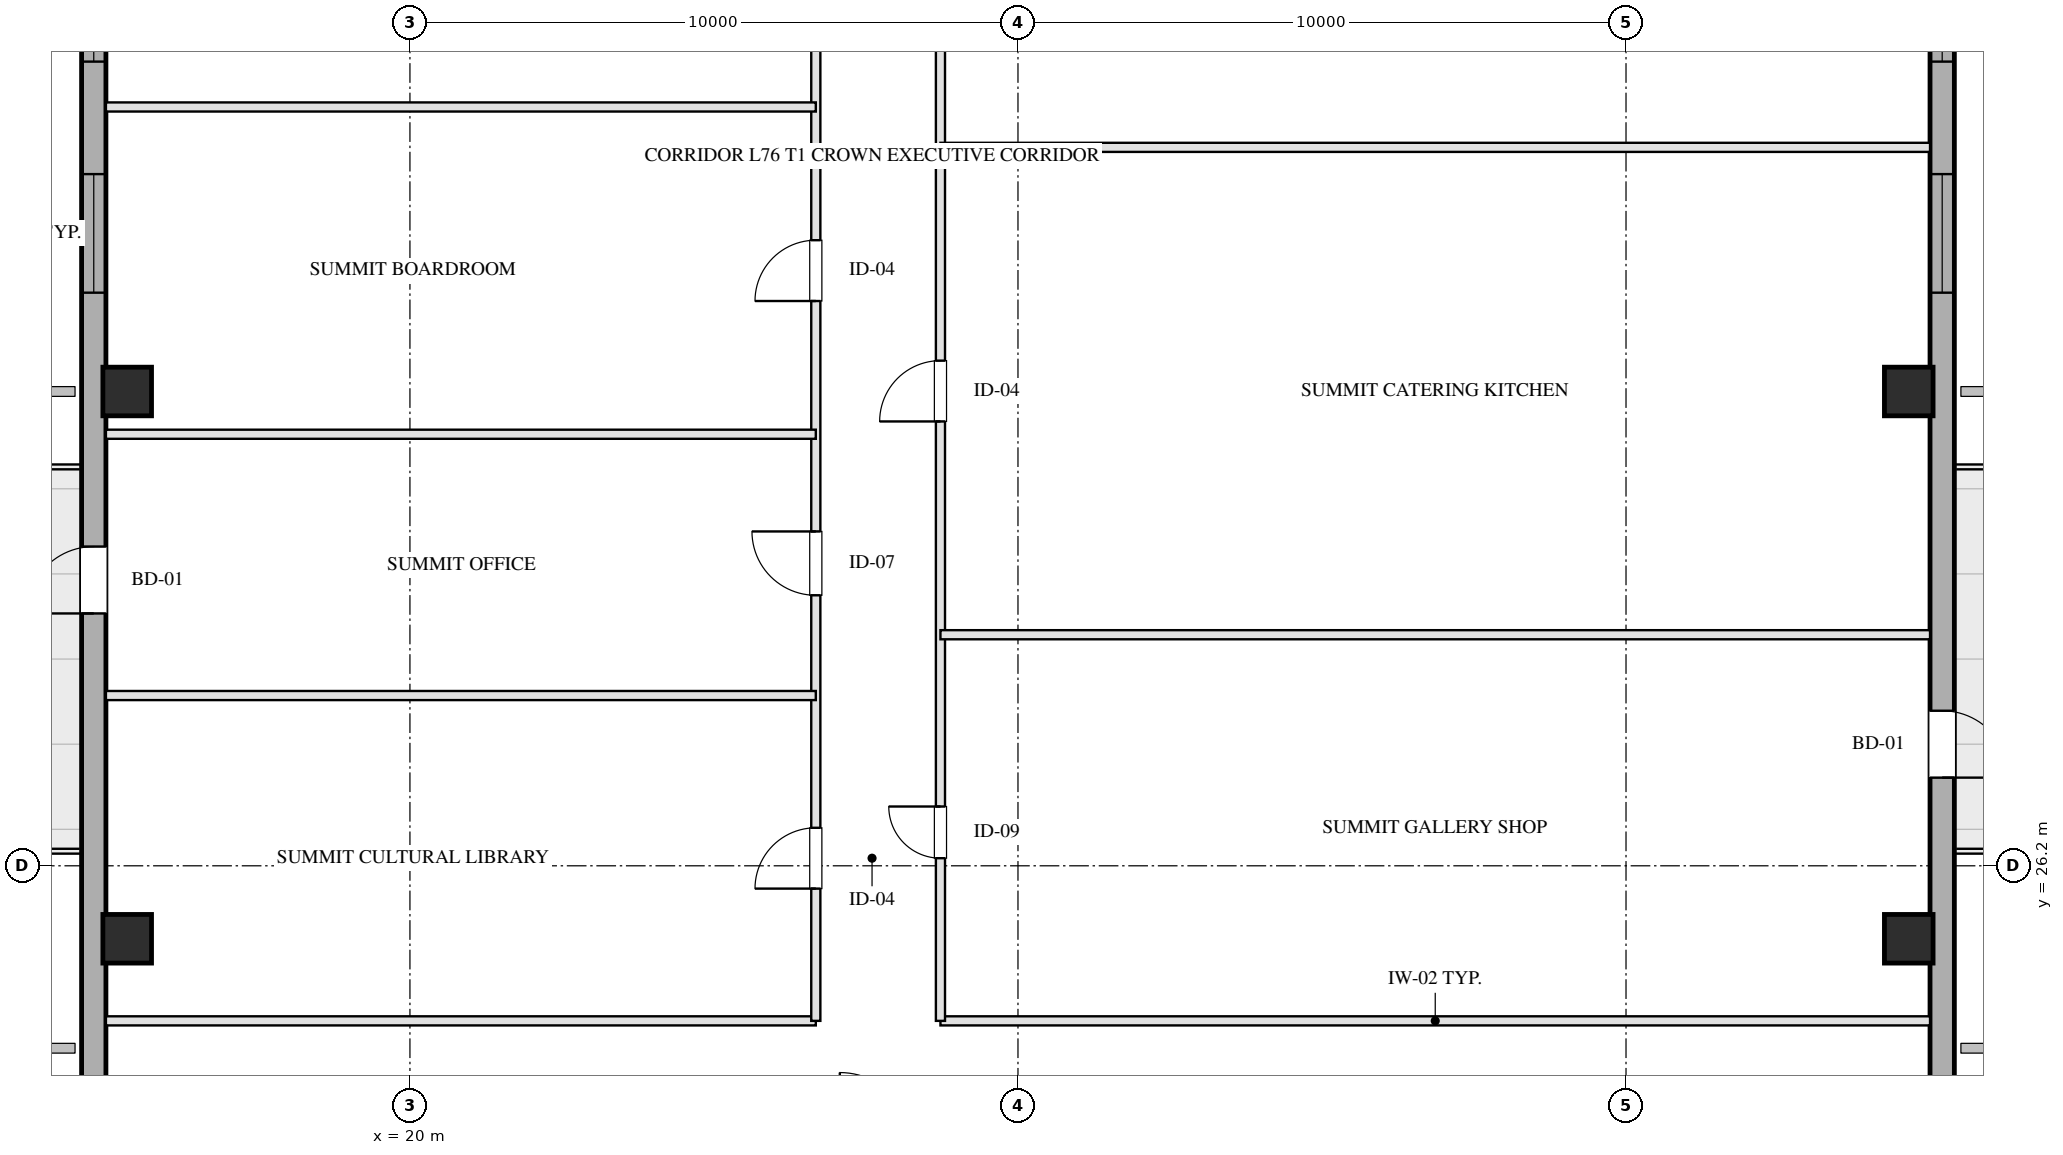
"""IFC4 building model, lengths in metres.
Left out: names, types, materials, properties, quantities, classifications, styles, units other than length and angle.
Written with IfcOpenShell. Run it as: python <this file> out.ifc"""

import sys

from ifc_helpers import new_model, si_unit, direction, frame, frame_2d, origin, origin_2d, place, context, subcontext, project, spatial, rectangle, hollow_rectangle, extrude, element, fill, save


model = new_model("IFC4")
c1 = context("Model", 3, precision=1e-05, world=origin(), true_north=direction((0.0, 1.0)))
c2 = subcontext(c1, "Body", "Model", "MODEL_VIEW")
j1 = project(units=[si_unit("LENGTHUNIT", "METRE"), si_unit("PLANEANGLEUNIT", "RADIAN")], contexts=[c1])
p1 = place(None, origin())
s1 = spatial("IfcSite", under=j1, at=p1, CompositionType="ELEMENT")
p2 = place(p1, origin())
s2 = spatial("IfcBuilding", under=s1, at=p2, CompositionType="ELEMENT")
p3 = place(p2, frame((0.0, 0.0, 276.0)))
s3 = spatial("IfcBuildingStorey", under=s2, at=p3, CompositionType="ELEMENT", Elevation=276.0)
for number, where, z_axis, x_axis in (
    (1, (15.35, 25.0, 0.0), (0.0, 0.0, 1.0), (1.0, 0.0, 0.0)),
    (2, (15.35, 34.0, 0.0), (0.0, 0.0, 1.0), (1.0, 0.0, 0.0)),
    (3, (44.65, 25.0, 0.0), (0.0, 0.0, 1.0), (1.0, 0.0, 0.0)),
    (4, (44.65, 34.0, 0.0), (0.0, 0.0, 1.0), (1.0, 0.0, 0.0)),
):
    element("IfcColumn", number, at=place(p3, frame(where, z_axis=z_axis, x_axis=x_axis)), inside=s3, PredefinedType="COLUMN", context=c2, shape_type="SweptSolid", body=[
        extrude(hollow_rectangle(XDim=0.8, YDim=0.8, WallThickness=0.028, at=origin_2d()), origin(), (0.0, 0.0, 1.0), 4.201),
    ])
p4 = place(p3, frame((14.8, 13.1, 0.0), z_axis=(0.0, 0.0, 1.0), x_axis=(0.0, 1.0, 0.0)))
e5 = element("IfcWall", 5, at=p4, inside=s3, PredefinedType="SOLIDWALL", context=c2, shape_type="SweptSolid", body=[
    extrude(rectangle(XDim=41.8, YDim=0.4, at=frame_2d((20.9, 0.0))), origin(), (0.0, 0.0, 1.0), 3.33),
])
p5 = place(p4, frame((22.525, 0.0, 0.75)))
e6 = element("IfcOpeningElement", 6, at=p5, cuts=e5, PredefinedType="OPENING", context=c2, shape_type="SweptSolid", body=[
    extrude(rectangle(XDim=1.95, YDim=1.65, at=frame_2d((0.975, 0.825))), frame((0.0, 0.21, 0.0), z_axis=(0.0, -1.0, 0.0), x_axis=(1.0, 0.0, 0.0)), (0.0, 0.0, 1.0), 0.42),
])
p6 = place(p4, frame((26.325, 0.0, 0.75)))
e7 = element("IfcOpeningElement", 7, at=p6, cuts=e5, PredefinedType="OPENING", context=c2, shape_type="SweptSolid", body=[
    extrude(rectangle(XDim=1.95, YDim=1.65, at=frame_2d((0.975, 0.825))), frame((0.0, 0.21, 0.0), z_axis=(0.0, -1.0, 0.0), x_axis=(1.0, 0.0, 0.0)), (0.0, 0.0, 1.0), 0.42),
])
p7 = place(p4, frame((17.25, 0.0, 0.0)))
e8 = element("IfcOpeningElement", 8, at=p7, cuts=e5, PredefinedType="OPENING", context=c2, shape_type="SweptSolid", body=[
    extrude(rectangle(XDim=1.1, YDim=2.15, at=frame_2d((0.55, 1.075))), frame((0.0, 0.21, 0.0), z_axis=(0.0, -1.0, 0.0), x_axis=(1.0, 0.0, 0.0)), (0.0, 0.0, 1.0), 0.42),
])
p8 = place(p3, frame((45.2, 54.9, 0.0), z_axis=(0.0, 0.0, 1.0), x_axis=(0.0, -1.0, 0.0)))
e9 = element("IfcWall", 9, at=p8, inside=s3, PredefinedType="SOLIDWALL", context=c2, shape_type="SweptSolid", body=[
    extrude(rectangle(XDim=41.8, YDim=0.4, at=frame_2d((20.9, 0.0))), origin(), (0.0, 0.0, 1.0), 3.33),
])
p9 = place(p8, frame((17.325, 0.0, 0.75)))
e10 = element("IfcOpeningElement", 10, at=p9, cuts=e9, PredefinedType="OPENING", context=c2, shape_type="SweptSolid", body=[
    extrude(rectangle(XDim=1.95, YDim=1.65, at=frame_2d((0.975, 0.825))), frame((0.0, 0.21, 0.0), z_axis=(0.0, -1.0, 0.0), x_axis=(1.0, 0.0, 0.0)), (0.0, 0.0, 1.0), 0.42),
])
p10 = place(p8, frame((13.525, 0.0, 0.75)))
e11 = element("IfcOpeningElement", 11, at=p10, cuts=e9, PredefinedType="OPENING", context=c2, shape_type="SweptSolid", body=[
    extrude(rectangle(XDim=1.95, YDim=1.65, at=frame_2d((0.975, 0.825))), frame((0.0, 0.21, 0.0), z_axis=(0.0, -1.0, 0.0), x_axis=(1.0, 0.0, 0.0)), (0.0, 0.0, 1.0), 0.42),
])
p11 = place(p8, frame((26.15, 0.0, 0.0)))
e12 = element("IfcOpeningElement", 12, at=p11, cuts=e9, PredefinedType="OPENING", context=c2, shape_type="SweptSolid", body=[
    extrude(rectangle(XDim=1.1, YDim=2.15, at=frame_2d((0.55, 1.075))), frame((0.0, 0.21, 0.0), z_axis=(0.0, -1.0, 0.0), x_axis=(1.0, 0.0, 0.0)), (0.0, 0.0, 1.0), 0.42),
])
p12 = place(p3, frame((15.0, 23.65, 0.0), z_axis=(0.0, 0.0, 1.0), x_axis=(1.0, 0.0, 0.0)))
e13 = element("IfcWall", 13, at=p12, inside=s3, PredefinedType="PARTITIONING", context=c2, shape_type="SweptSolid", body=[
    extrude(rectangle(XDim=11.675, YDim=0.15, at=frame_2d((5.837, 0.0))), origin(), (0.0, 0.0, 1.0), 3.925),
])
p13 = place(p3, frame((28.725, 23.65, 0.0), z_axis=(0.0, 0.0, 1.0), x_axis=(1.0, 0.0, 0.0)))
e14 = element("IfcWall", 14, at=p13, inside=s3, PredefinedType="PARTITIONING", context=c2, shape_type="SweptSolid", body=[
    extrude(rectangle(XDim=16.275, YDim=0.15, at=frame_2d((8.137, 0.0))), origin(), (0.0, 0.0, 1.0), 3.925),
])
p14 = place(p3, frame((26.675, 23.65, 0.0), z_axis=(0.0, 0.0, 1.0), x_axis=(0.0, 1.0, 0.0)))
e15 = element("IfcWall", 15, at=p14, inside=s3, PredefinedType="PARTITIONING", context=c2, shape_type="SweptSolid", body=[
    extrude(rectangle(XDim=20.7, YDim=0.15, at=frame_2d((10.35, 0.0))), origin(), (0.0, 0.0, 1.0), 3.925),
])
p15 = place(p14, frame((2.175, 0.0, 0.0)))
e16 = element("IfcOpeningElement", 16, at=p15, cuts=e15, PredefinedType="OPENING", context=c2, shape_type="SweptSolid", body=[
    extrude(rectangle(XDim=1.0, YDim=2.05, at=frame_2d((0.5, 1.025))), frame((0.0, 0.085, 0.0), z_axis=(0.0, -1.0, 0.0), x_axis=(1.0, 0.0, 0.0)), (0.0, 0.0, 1.0), 0.17),
])
p16 = place(p14, frame((6.999, 0.0, 0.0)))
e17 = element("IfcOpeningElement", 17, at=p16, cuts=e15, PredefinedType="OPENING", context=c2, shape_type="SweptSolid", body=[
    extrude(rectangle(XDim=1.05, YDim=2.05, at=frame_2d((0.525, 1.025))), frame((0.0, 0.085, 0.0), z_axis=(0.0, -1.0, 0.0), x_axis=(1.0, 0.0, 0.0)), (0.0, 0.0, 1.0), 0.17),
])
p17 = place(p14, frame((11.838, 0.0, 0.0)))
e18 = element("IfcOpeningElement", 18, at=p17, cuts=e15, PredefinedType="OPENING", context=c2, shape_type="SweptSolid", body=[
    extrude(rectangle(XDim=1.0, YDim=2.05, at=frame_2d((0.5, 1.025))), frame((0.0, 0.085, 0.0), z_axis=(0.0, -1.0, 0.0), x_axis=(1.0, 0.0, 0.0)), (0.0, 0.0, 1.0), 0.17),
])
p18 = place(p14, frame((17.365, 0.0, 0.0)))
e19 = element("IfcOpeningElement", 19, at=p18, cuts=e15, PredefinedType="OPENING", context=c2, shape_type="SweptSolid", body=[
    extrude(rectangle(XDim=1.0, YDim=2.05, at=frame_2d((0.5, 1.025))), frame((0.0, 0.085, 0.0), z_axis=(0.0, -1.0, 0.0), x_axis=(1.0, 0.0, 0.0)), (0.0, 0.0, 1.0), 0.17),
])
p19 = place(p3, frame((28.725, 23.65, 0.0), z_axis=(0.0, 0.0, 1.0), x_axis=(0.0, 1.0, 0.0)))
e20 = element("IfcWall", 20, at=p19, inside=s3, PredefinedType="PARTITIONING", context=c2, shape_type="SweptSolid", body=[
    extrude(rectangle(XDim=20.7, YDim=0.15, at=frame_2d((10.35, 0.0))), origin(), (0.0, 0.0, 1.0), 3.925),
])
p20 = place(p19, frame((2.675, 0.0, 0.0)))
e21 = element("IfcOpeningElement", 21, at=p20, cuts=e20, PredefinedType="OPENING", context=c2, shape_type="SweptSolid", body=[
    extrude(rectangle(XDim=0.85, YDim=2.05, at=frame_2d((0.425, 1.025))), frame((0.0, 0.085, 0.0), z_axis=(0.0, -1.0, 0.0), x_axis=(1.0, 0.0, 0.0)), (0.0, 0.0, 1.0), 0.17),
])
p21 = place(p19, frame((9.857, 0.0, 0.0)))
e22 = element("IfcOpeningElement", 22, at=p21, cuts=e20, PredefinedType="OPENING", context=c2, shape_type="SweptSolid", body=[
    extrude(rectangle(XDim=1.0, YDim=2.05, at=frame_2d((0.5, 1.025))), frame((0.0, 0.085, 0.0), z_axis=(0.0, -1.0, 0.0), x_axis=(1.0, 0.0, 0.0)), (0.0, 0.0, 1.0), 0.17),
])
p22 = place(p19, frame((17.032, 0.0, 0.0)))
e23 = element("IfcOpeningElement", 23, at=p22, cuts=e20, PredefinedType="OPENING", context=c2, shape_type="SweptSolid", body=[
    extrude(rectangle(XDim=1.0, YDim=2.05, at=frame_2d((0.5, 1.025))), frame((0.0, 0.085, 0.0), z_axis=(0.0, -1.0, 0.0), x_axis=(1.0, 0.0, 0.0)), (0.0, 0.0, 1.0), 0.17),
])
for number, where, z_axis, x_axis in (
    (24, (15.0, 29.0, 0.0), (0.0, 0.0, 1.0), (1.0, 0.0, 0.0)),
    (25, (15.0, 33.297, 0.0), (0.0, 0.0, 1.0), (1.0, 0.0, 0.0)),
    (26, (15.0, 38.679, 0.0), (0.0, 0.0, 1.0), (1.0, 0.0, 0.0)),
):
    element("IfcWall", number, at=place(p3, frame(where, z_axis=z_axis, x_axis=x_axis)), inside=s3, PredefinedType="PARTITIONING", context=c2, shape_type="SweptSolid", body=[
        extrude(rectangle(XDim=11.675, YDim=0.15, at=frame_2d((5.837, 0.0))), origin(), (0.0, 0.0, 1.0), 3.925),
    ])
for number, where, z_axis, x_axis in (
    (27, (28.725, 30.0, 0.0), (0.0, 0.0, 1.0), (1.0, 0.0, 0.0)),
    (28, (28.725, 38.015, 0.0), (0.0, 0.0, 1.0), (1.0, 0.0, 0.0)),
):
    element("IfcWall", number, at=place(p3, frame(where, z_axis=z_axis, x_axis=x_axis)), inside=s3, PredefinedType="PARTITIONING", context=c2, shape_type="SweptSolid", body=[
        extrude(rectangle(XDim=16.275, YDim=0.15, at=frame_2d((8.137, 0.0))), origin(), (0.0, 0.0, 1.0), 3.925),
    ])
p23 = place(p5, origin())
e29 = element("IfcWindow", 29, at=p23, inside=s3, PartitioningType="TRIPLE_PANEL_VERTICAL", PredefinedType="WINDOW", context=c2, shape_type="SweptSolid", body=[
    extrude(rectangle(XDim=1.95, YDim=1.65, at=frame_2d((0.975, 0.825))), frame((0.0, 0.03, 0.0), z_axis=(0.0, -1.0, 0.0), x_axis=(1.0, 0.0, 0.0)), (0.0, 0.0, 1.0), 0.06),
])
fill(e6, e29)
p24 = place(p6, origin())
e30 = element("IfcWindow", 30, at=p24, inside=s3, PartitioningType="TRIPLE_PANEL_VERTICAL", PredefinedType="WINDOW", context=c2, shape_type="SweptSolid", body=[
    extrude(rectangle(XDim=1.95, YDim=1.65, at=frame_2d((0.975, 0.825))), frame((0.0, 0.03, 0.0), z_axis=(0.0, -1.0, 0.0), x_axis=(1.0, 0.0, 0.0)), (0.0, 0.0, 1.0), 0.06),
])
fill(e7, e30)
p25 = place(p9, origin())
e31 = element("IfcWindow", 31, at=p25, inside=s3, PartitioningType="TRIPLE_PANEL_VERTICAL", PredefinedType="WINDOW", context=c2, shape_type="SweptSolid", body=[
    extrude(rectangle(XDim=1.95, YDim=1.65, at=frame_2d((0.975, 0.825))), frame((0.0, 0.03, 0.0), z_axis=(0.0, -1.0, 0.0), x_axis=(1.0, 0.0, 0.0)), (0.0, 0.0, 1.0), 0.06),
])
fill(e10, e31)
p26 = place(p10, origin())
e32 = element("IfcWindow", 32, at=p26, inside=s3, PartitioningType="TRIPLE_PANEL_VERTICAL", PredefinedType="WINDOW", context=c2, shape_type="SweptSolid", body=[
    extrude(rectangle(XDim=1.95, YDim=1.65, at=frame_2d((0.975, 0.825))), frame((0.0, 0.03, 0.0), z_axis=(0.0, -1.0, 0.0), x_axis=(1.0, 0.0, 0.0)), (0.0, 0.0, 1.0), 0.06),
])
fill(e11, e32)
p27 = place(p7, origin())
e33 = element("IfcDoor", 33, at=p27, inside=s3, OperationType="SINGLE_SWING_LEFT", PredefinedType="DOOR", context=c2, shape_type="SweptSolid", body=[
    extrude(rectangle(XDim=1.1, YDim=2.15, at=frame_2d((0.55, 1.075))), frame((0.0, 0.025, 0.0), z_axis=(0.0, -1.0, 0.0), x_axis=(1.0, 0.0, 0.0)), (0.0, 0.0, 1.0), 0.05),
])
fill(e8, e33)
p28 = place(p11, origin())
e34 = element("IfcDoor", 34, at=p28, inside=s3, OperationType="SINGLE_SWING_RIGHT", PredefinedType="DOOR", context=c2, shape_type="SweptSolid", body=[
    extrude(rectangle(XDim=1.1, YDim=2.15, at=frame_2d((0.55, 1.075))), frame((0.0, 0.025, 0.0), z_axis=(0.0, -1.0, 0.0), x_axis=(1.0, 0.0, 0.0)), (0.0, 0.0, 1.0), 0.05),
])
fill(e12, e34)
p29 = place(p15, origin())
e35 = element("IfcDoor", 35, at=p29, inside=s3, OperationType="SINGLE_SWING_LEFT", PredefinedType="DOOR", context=c2, shape_type="SweptSolid", body=[
    extrude(rectangle(XDim=1.0, YDim=2.05, at=frame_2d((0.5, 1.025))), frame((0.0, 0.025, 0.0), z_axis=(0.0, -1.0, 0.0), x_axis=(1.0, 0.0, 0.0)), (0.0, 0.0, 1.0), 0.05),
])
fill(e16, e35)
p30 = place(p16, origin())
e36 = element("IfcDoor", 36, at=p30, inside=s3, OperationType="SINGLE_SWING_RIGHT", PredefinedType="DOOR", context=c2, shape_type="SweptSolid", body=[
    extrude(rectangle(XDim=1.05, YDim=2.05, at=frame_2d((0.525, 1.025))), frame((0.0, 0.025, 0.0), z_axis=(0.0, -1.0, 0.0), x_axis=(1.0, 0.0, 0.0)), (0.0, 0.0, 1.0), 0.05),
])
fill(e17, e36)
p31 = place(p17, origin())
e37 = element("IfcDoor", 37, at=p31, inside=s3, OperationType="SINGLE_SWING_LEFT", PredefinedType="DOOR", context=c2, shape_type="SweptSolid", body=[
    extrude(rectangle(XDim=1.0, YDim=2.05, at=frame_2d((0.5, 1.025))), frame((0.0, 0.025, 0.0), z_axis=(0.0, -1.0, 0.0), x_axis=(1.0, 0.0, 0.0)), (0.0, 0.0, 1.0), 0.05),
])
fill(e18, e37)
p32 = place(p20, origin())
e38 = element("IfcDoor", 38, at=p32, inside=s3, OperationType="SINGLE_SWING_RIGHT", PredefinedType="DOOR", context=c2, shape_type="SweptSolid", body=[
    extrude(rectangle(XDim=0.85, YDim=2.05, at=frame_2d((0.425, 1.025))), frame((0.0, 0.025, 0.0), z_axis=(0.0, -1.0, 0.0), x_axis=(1.0, 0.0, 0.0)), (0.0, 0.0, 1.0), 0.05),
])
fill(e21, e38)
p33 = place(p21, origin())
e39 = element("IfcDoor", 39, at=p33, inside=s3, OperationType="SINGLE_SWING_LEFT", PredefinedType="DOOR", context=c2, shape_type="SweptSolid", body=[
    extrude(rectangle(XDim=1.0, YDim=2.05, at=frame_2d((0.5, 1.025))), frame((0.0, 0.025, 0.0), z_axis=(0.0, -1.0, 0.0), x_axis=(1.0, 0.0, 0.0)), (0.0, 0.0, 1.0), 0.05),
])
fill(e22, e39)
save(model, sys.argv[1])
